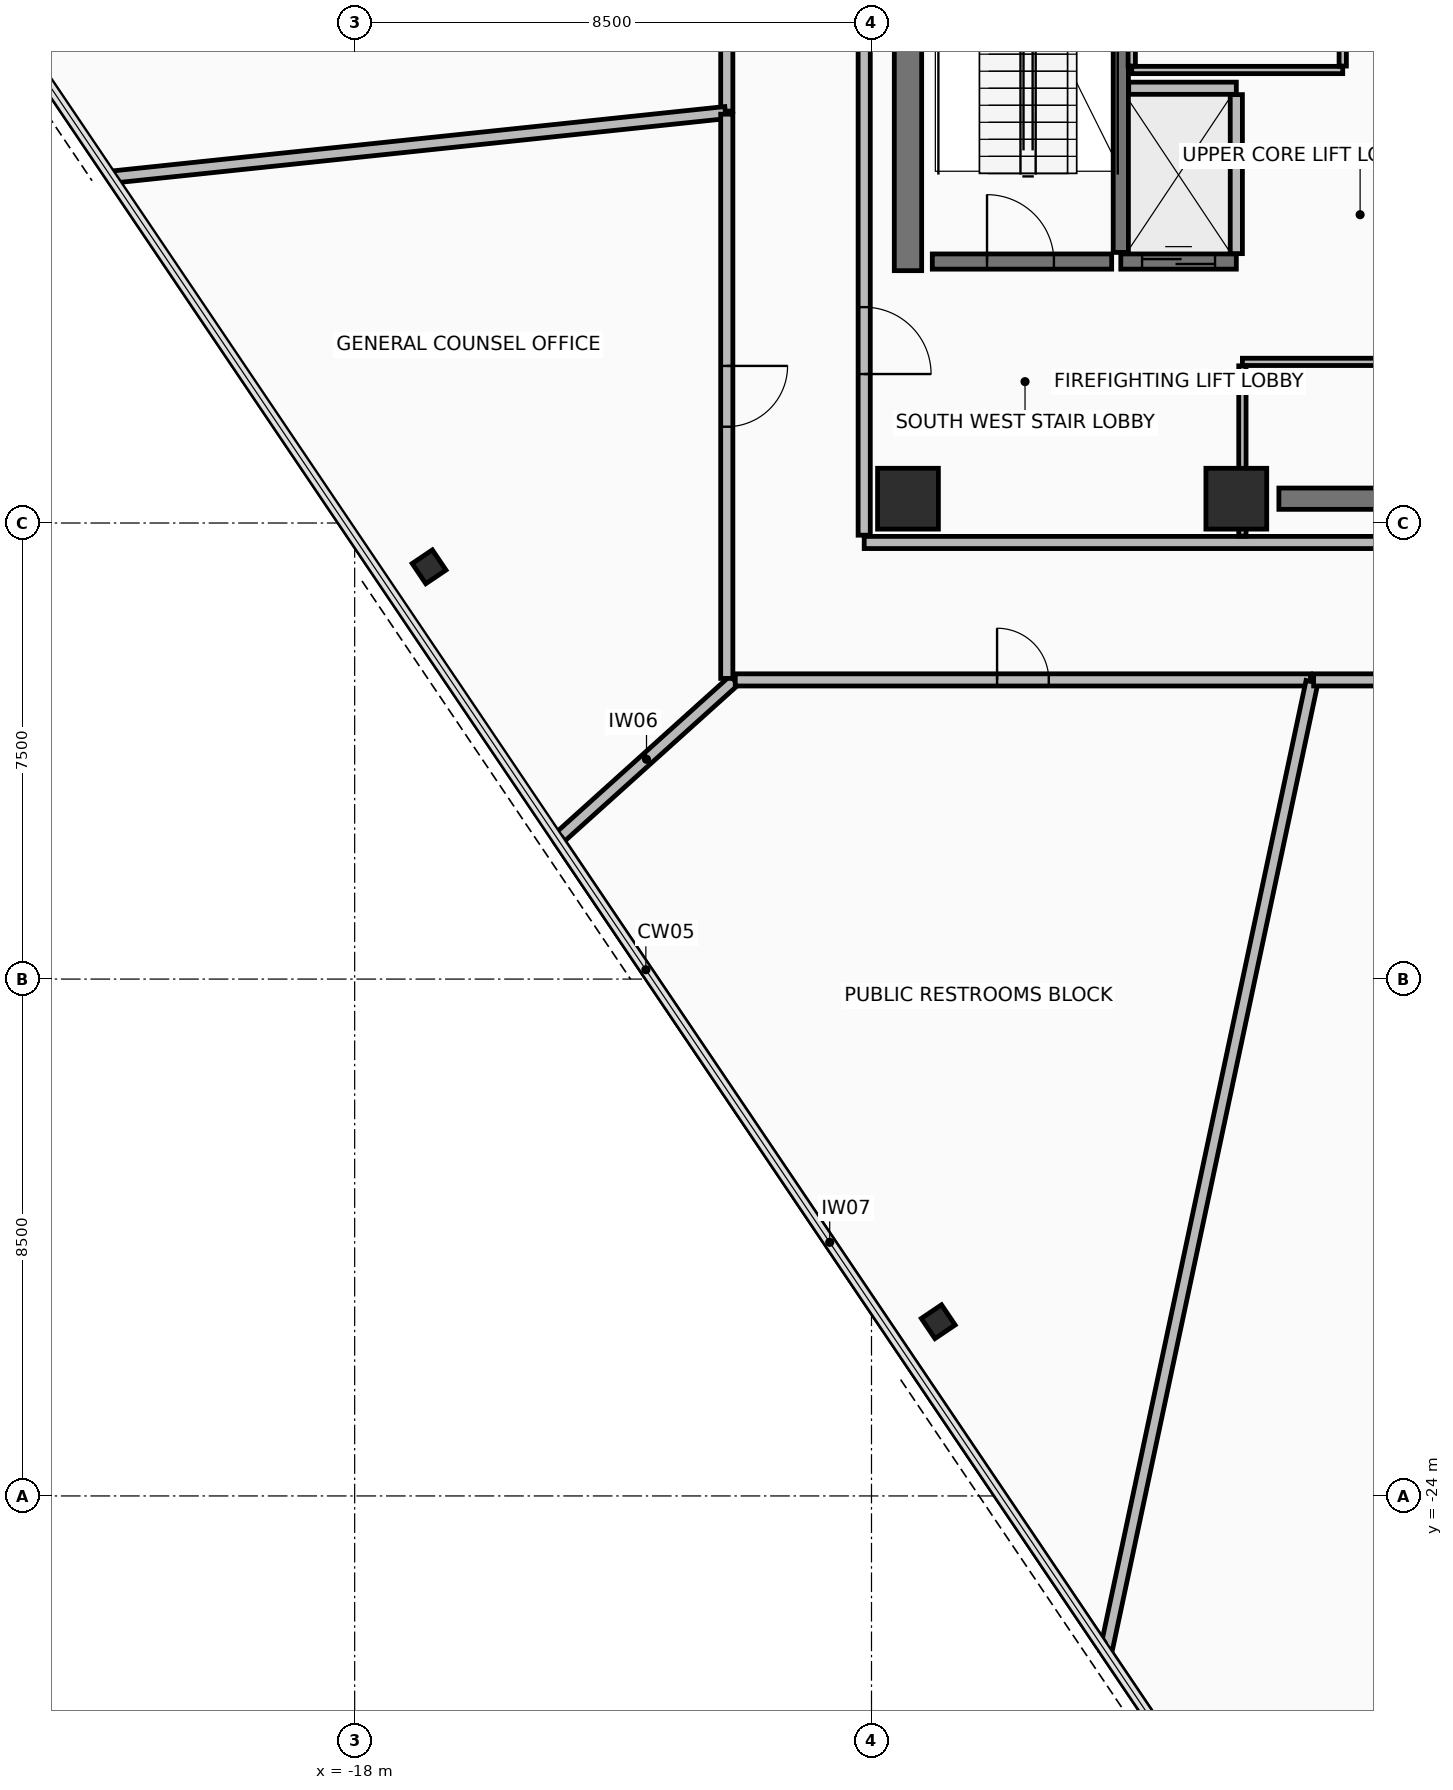
"""IFC4 building model, lengths in metres.
Left out: names, types, materials, properties, quantities, classifications, styles, units other than length and angle.
Written with IfcOpenShell. Run it as: python <this file> out.ifc"""

import sys

from ifc_helpers import new_model, si_unit, direction, frame, frame_2d, origin, origin_2d, place, context, subcontext, project, spatial, rectangle, hollow_rectangle, extrude, element, fill, save


model = new_model("IFC4")
c1 = context("Model", 3, precision=1e-05, world=origin(), true_north=direction((0.0, 1.0)))
c2 = subcontext(c1, "Body", "Model", "MODEL_VIEW")
j1 = project(units=[si_unit("LENGTHUNIT", "METRE"), si_unit("PLANEANGLEUNIT", "RADIAN")], contexts=[c1])
p1 = place(None, origin())
s1 = spatial("IfcSite", under=j1, at=p1, CompositionType="ELEMENT")
p2 = place(p1, origin())
s2 = spatial("IfcBuilding", under=s1, at=p2, CompositionType="ELEMENT")
p3 = place(p2, frame((0.0, 0.0, 260.6)))
s3 = spatial("IfcBuildingStorey", under=s2, at=p3, CompositionType="ELEMENT", Elevation=260.6)
for number, where, z_axis, x_axis in (
    (1, (-8.9, -7.6, 0.0), (0.0, 0.0, 1.0), (1.0, 0.0, 0.0)),
    (2, (-3.5, -7.6, 0.0), (0.0, 0.0, 1.0), (1.0, 0.0, 0.0)),
):
    element("IfcColumn", number, at=place(p3, frame(where, z_axis=z_axis, x_axis=x_axis)), inside=s3, PredefinedType="COLUMN", context=c2, shape_type="SweptSolid", body=[
        extrude(rectangle(XDim=1.0, YDim=1.0, at=origin_2d()), origin(), (0.0, 0.0, 1.0), 3.6),
    ])
for number, where, z_axis, x_axis in (
    (3, (-16.776, -8.72, 0.0), (0.0, 0.0, 1.0), (-0.559, 0.829, 0.0)),
    (4, (-8.402, -21.135, 0.0), (0.0, 0.0, 1.0), (-0.559, 0.829, 0.0)),
):
    element("IfcColumn", number, at=place(p3, frame(where, z_axis=z_axis, x_axis=x_axis)), inside=s3, PredefinedType="COLUMN", context=c2, shape_type="SweptSolid", body=[
        extrude(hollow_rectangle(XDim=0.4, YDim=0.4, WallThickness=0.025, at=origin_2d()), origin(), (0.0, 0.0, 1.0), 3.6),
    ])
p4 = place(p3, frame((-2.8, -7.6, 0.0), z_axis=(0.0, 0.0, 1.0), x_axis=(1.0, 0.0, 0.0)))
e5 = element("IfcWall", 5, at=p4, inside=s3, PredefinedType="SHEAR", context=c2, shape_type="SweptSolid", body=[
    extrude(rectangle(XDim=5.38, YDim=0.35, at=frame_2d((2.69, 0.0))), origin(), (0.0, 0.0, 1.0), 3.42),
])
p5 = place(p3, frame((-8.9, -3.85, 0.0), z_axis=(0.0, 0.0, 1.0), x_axis=(0.0, 1.0, 0.0)))
e6 = element("IfcWall", 6, at=p5, inside=s3, PredefinedType="SHEAR", context=c2, shape_type="SweptSolid", body=[
    extrude(rectangle(XDim=10.7, YDim=0.45, at=frame_2d((5.35, 0.0))), origin(), (0.0, 0.0, 1.0), 3.42),
])
p6 = place(p3, frame((-9.62, -8.32, 0.0), z_axis=(0.0, 0.0, 1.0), x_axis=(1.0, 0.0, 0.0)))
e7 = element("IfcWall", 7, at=p6, inside=s3, PredefinedType="PARTITIONING", context=c2, shape_type="SweptSolid", body=[
    extrude(rectangle(XDim=19.24, YDim=0.2, at=frame_2d((9.62, 0.0))), origin(), (0.0, 0.0, 1.0), 2.915),
])
p7 = place(p6, frame((8.57, 0.0, 0.0)))
e8 = element("IfcOpeningElement", 8, at=p7, cuts=e7, PredefinedType="OPENING", context=c2, shape_type="SweptSolid", body=[
    extrude(rectangle(XDim=0.9, YDim=2.1, at=frame_2d((0.45, 1.05))), frame((0.0, 0.11, 0.0), z_axis=(0.0, -1.0, 0.0), x_axis=(1.0, 0.0, 0.0)), (0.0, 0.0, 1.0), 0.22),
])
p8 = place(p6, frame((15.02, 0.0, 0.0)))
e9 = element("IfcOpeningElement", 9, at=p8, cuts=e7, PredefinedType="OPENING", context=c2, shape_type="SweptSolid", body=[
    extrude(rectangle(XDim=0.9, YDim=2.1, at=frame_2d((0.45, 1.05))), frame((0.0, 0.11, 0.0), z_axis=(0.0, -1.0, 0.0), x_axis=(1.0, 0.0, 0.0)), (0.0, 0.0, 1.0), 0.22),
])
p9 = place(p3, frame((-9.62, 8.2, 0.0), z_axis=(0.0, 0.0, 1.0), x_axis=(0.0, -1.0, 0.0)))
e10 = element("IfcWall", 10, at=p9, inside=s3, PredefinedType="PARTITIONING", context=c2, shape_type="SweptSolid", body=[
    extrude(rectangle(XDim=16.4, YDim=0.2, at=frame_2d((8.2, 0.0))), origin(), (0.0, 0.0, 1.0), 2.765),
])
p10 = place(p9, frame((12.65, 0.0, 0.0)))
e11 = element("IfcOpeningElement", 11, at=p10, cuts=e10, PredefinedType="OPENING", context=c2, shape_type="SweptSolid", body=[
    extrude(rectangle(XDim=1.1, YDim=2.15, at=frame_2d((0.55, 1.075))), frame((0.0, 0.11, 0.0), z_axis=(0.0, -1.0, 0.0), x_axis=(1.0, 0.0, 0.0)), (0.0, 0.0, 1.0), 0.22),
])
p11 = place(p3, frame((-5.4, -3.55, 0.0), z_axis=(0.0, 0.0, 1.0), x_axis=(0.0, 1.0, 0.0)))
e12 = element("IfcWall", 12, at=p11, inside=s3, PredefinedType="SHEAR", context=c2, shape_type="SweptSolid", body=[
    extrude(rectangle(XDim=7.3, YDim=0.25, at=frame_2d((3.65, 0.0))), origin(), (0.0, 0.0, 1.0), 3.42),
])
p12 = place(p3, frame((-8.5, -3.7, 0.0), z_axis=(0.0, 0.0, 1.0), x_axis=(1.0, 0.0, 0.0)))
e13 = element("IfcWall", 13, at=p12, inside=s3, PredefinedType="SHEAR", context=c2, shape_type="SweptSolid", body=[
    extrude(rectangle(XDim=2.95, YDim=0.25, at=frame_2d((1.475, 0.0))), origin(), (0.0, 0.0, 1.0), 3.42),
])
p13 = place(p12, frame((0.9, 0.0, 0.0)))
e14 = element("IfcOpeningElement", 14, at=p13, cuts=e13, PredefinedType="OPENING", context=c2, shape_type="SweptSolid", body=[
    extrude(rectangle(XDim=1.1, YDim=2.15, at=frame_2d((0.55, 1.075))), frame((0.0, 0.135, 0.0), z_axis=(0.0, -1.0, 0.0), x_axis=(1.0, 0.0, 0.0)), (0.0, 0.0, 1.0), 0.27),
])
p14 = place(p3, frame((-5.4, -3.7, 0.0), z_axis=(0.0, 0.0, 1.0), x_axis=(1.0, 0.0, 0.0)))
e15 = element("IfcWall", 15, at=p14, inside=s3, PredefinedType="SHEAR", context=c2, shape_type="SweptSolid", body=[
    extrude(rectangle(XDim=1.9, YDim=0.25, at=frame_2d((0.95, 0.0))), origin(), (0.0, 0.0, 1.0), 3.42),
])
p15 = place(p14, frame((0.35, 0.0, 0.0)))
e16 = element("IfcOpeningElement", 16, at=p15, cuts=e15, PredefinedType="OPENING", context=c2, shape_type="SweptSolid", body=[
    extrude(rectangle(XDim=1.2, YDim=2.2, at=frame_2d((0.6, 1.1))), frame((0.0, 0.135, 0.0), z_axis=(0.0, -1.0, 0.0), x_axis=(1.0, 0.0, 0.0)), (0.0, 0.0, 1.0), 0.27),
])
p16 = place(p3, frame((-5.27, -0.85, 0.0), z_axis=(0.0, 0.0, 1.0), x_axis=(1.0, 0.0, 0.0)))
e17 = element("IfcWall", 17, at=p16, inside=s3, PredefinedType="PARTITIONING", context=c2, shape_type="SweptSolid", body=[
    extrude(rectangle(XDim=1.77, YDim=0.2, at=frame_2d((0.885, 0.0))), origin(), (0.0, 0.0, 1.0), 3.42),
])
p17 = place(p3, frame((-3.5, -3.57, 0.0), z_axis=(0.0, 0.0, 1.0), x_axis=(0.0, 1.0, 0.0)))
e18 = element("IfcWall", 18, at=p17, inside=s3, PredefinedType="PARTITIONING", context=c2, shape_type="SweptSolid", body=[
    extrude(rectangle(XDim=2.615, YDim=0.2, at=frame_2d((1.308, 0.0))), origin(), (0.0, 0.0, 1.0), 3.42),
])
p18 = place(p3, frame((-5.22, -0.55, 0.0), z_axis=(0.0, 0.0, 1.0), x_axis=(1.0, 0.0, 0.0)))
e19 = element("IfcWall", 19, at=p18, inside=s3, PredefinedType="PARTITIONING", context=c2, shape_type="SweptSolid", body=[
    extrude(rectangle(XDim=3.47, YDim=0.12, at=frame_2d((1.735, 0.0))), origin(), (0.0, 0.0, 1.0), 3.42),
])
p19 = place(p3, frame((-1.75, -0.485, 0.0), z_axis=(0.0, 0.0, 1.0), x_axis=(0.0, 1.0, 0.0)))
e20 = element("IfcWall", 20, at=p19, inside=s3, PredefinedType="PARTITIONING", context=c2, shape_type="SweptSolid", body=[
    extrude(rectangle(XDim=1.825, YDim=0.12, at=frame_2d((0.913, 0.0))), origin(), (0.0, 0.0, 1.0), 3.42),
])
p20 = place(p19, frame((0.488, 0.0, 0.0)))
e21 = element("IfcOpeningElement", 21, at=p20, cuts=e20, PredefinedType="OPENING", context=c2, shape_type="SweptSolid", body=[
    extrude(rectangle(XDim=0.85, YDim=2.1, at=frame_2d((0.425, 1.05))), frame((0.0, 0.07, 0.0), z_axis=(0.0, -1.0, 0.0), x_axis=(1.0, 0.0, 0.0)), (0.0, 0.0, 1.0), 0.14),
])
p21 = place(p3, frame((-5.22, 1.275, 0.0), z_axis=(0.0, 0.0, 1.0), x_axis=(0.0, -1.0, 0.0)))
e22 = element("IfcWall", 22, at=p21, inside=s3, PredefinedType="PARTITIONING", context=c2, shape_type="SweptSolid", body=[
    extrude(rectangle(XDim=1.76, YDim=0.12, at=frame_2d((0.88, 0.0))), origin(), (0.0, 0.0, 1.0), 3.42),
])
p22 = place(p3, frame((2.135, -5.35, 0.0), z_axis=(0.0, 0.0, 1.0), x_axis=(-1.0, 0.0, 0.0)))
e23 = element("IfcWall", 23, at=p22, inside=s3, PredefinedType="PARTITIONING", context=c2, shape_type="SweptSolid", body=[
    extrude(rectangle(XDim=5.535, YDim=0.12, at=frame_2d((2.768, 0.0))), origin(), (0.0, 0.0, 1.0), 2.715),
])
p23 = place(p3, frame((-3.4, -5.415, 0.0), z_axis=(0.0, 0.0, 1.0), x_axis=(0.0, -1.0, 0.0)))
e24 = element("IfcWall", 24, at=p23, inside=s3, PredefinedType="PARTITIONING", context=c2, shape_type="SweptSolid", body=[
    extrude(rectangle(XDim=2.8, YDim=0.12, at=frame_2d((1.4, 0.0))), origin(), (0.0, 0.0, 1.0), 2.715),
])
p24 = place(p3, frame((-14.643, -13.185, 0.0), z_axis=(0.0, 0.0, 1.0), x_axis=(0.74316596467, 0.669107128161, 0.0)))
e25 = element("IfcWall", 25, at=p24, inside=s3, PredefinedType="PARTITIONING", context=c2, shape_type="SweptSolid", body=[
    extrude(rectangle(XDim=3.883, YDim=0.2, at=frame_2d((1.942, 0.0))), origin(), (0.0, 0.0, 1.0), 2.765),
])
p25 = place(p3, frame((-11.741, -10.58, 0.0), z_axis=(0.0, 0.0, 1.0), x_axis=(1.0, 0.0, 0.0)))
e26 = element("IfcWall", 26, at=p25, inside=s3, PredefinedType="PARTITIONING", context=c2, shape_type="SweptSolid", body=[
    extrude(rectangle(XDim=9.461, YDim=0.2, at=frame_2d((4.73, 0.0))), origin(), (0.0, 0.0, 1.0), 2.915),
])
p26 = place(p25, frame((4.306, 0.0, 0.0)))
e27 = element("IfcOpeningElement", 27, at=p26, cuts=e26, PredefinedType="OPENING", context=c2, shape_type="SweptSolid", body=[
    extrude(rectangle(XDim=0.85, YDim=2.1, at=frame_2d((0.425, 1.05))), frame((0.0, 0.11, 0.0), z_axis=(0.0, -1.0, 0.0), x_axis=(1.0, 0.0, 0.0)), (0.0, 0.0, 1.0), 0.22),
])
p27 = place(p3, frame((-2.255, -10.61, 0.0), z_axis=(0.0, 0.0, 1.0), x_axis=(-0.207902262157, -0.97814960481, 0.0)))
e28 = element("IfcWall", 28, at=p27, inside=s3, PredefinedType="PARTITIONING", context=c2, shape_type="SweptSolid", body=[
    extrude(rectangle(XDim=16.309, YDim=0.2, at=frame_2d((8.154, 0.0))), origin(), (0.0, 0.0, 1.0), 2.765),
])
p28 = place(p3, frame((-5.728, -26.441, 0.0), z_axis=(0.0, 0.0, 1.0), x_axis=(-0.559188397691, 0.829040611724, 0.0)))
e29 = element("IfcWall", 29, at=p28, inside=s3, PredefinedType="PARTITIONING", context=c2, shape_type="SweptSolid", body=[
    extrude(rectangle(XDim=15.951, YDim=0.15, at=frame_2d((7.976, 0.0))), origin(), (0.0, 0.0, 1.0), 3.42),
])
p29 = place(p3, frame((-0.024, -34.897, 0.0), z_axis=(0.0, 0.0, 1.0), x_axis=(-0.559196847428, 0.829034912309, 0.0)))
e30 = element("IfcWall", 30, at=p29, inside=s3, PredefinedType="PARTITIONING", context=c2, shape_type="SweptSolid", body=[
    extrude(rectangle(XDim=10.043, YDim=0.15, at=frame_2d((5.021, 0.0))), origin(), (0.0, 0.0, 1.0), 3.42),
])
p30 = place(p3, frame((-2.229, -10.58, 0.0), z_axis=(0.0, 0.0, 1.0), x_axis=(1.0, 0.0, 0.0)))
e31 = element("IfcWall", 31, at=p30, inside=s3, PredefinedType="PARTITIONING", context=c2, shape_type="SweptSolid", body=[
    extrude(rectangle(XDim=6.923, YDim=0.2, at=frame_2d((3.461, 0.0))), origin(), (0.0, 0.0, 1.0), 3.42),
])
p31 = place(p30, frame((3.036, 0.0, 0.0)))
e32 = element("IfcOpeningElement", 32, at=p31, cuts=e31, PredefinedType="OPENING", context=c2, shape_type="SweptSolid", body=[
    extrude(rectangle(XDim=0.85, YDim=2.1, at=frame_2d((0.425, 1.05))), frame((0.0, 0.11, 0.0), z_axis=(0.0, -1.0, 0.0), x_axis=(1.0, 0.0, 0.0)), (0.0, 0.0, 1.0), 0.22),
])
p32 = place(p3, frame((-11.88, 6.844, 0.0), z_axis=(0.0, 0.0, 1.0), x_axis=(0.0, -1.0, 0.0)))
e33 = element("IfcWall", 33, at=p32, inside=s3, PredefinedType="PARTITIONING", context=c2, shape_type="SweptSolid", body=[
    extrude(rectangle(XDim=8.071, YDim=0.2, at=frame_2d((4.035, 0.0))), origin(), (0.0, 0.0, 1.0), 2.915),
])
p33 = place(p32, frame((3.535, 0.0, 0.0)))
e34 = element("IfcOpeningElement", 34, at=p33, cuts=e33, PredefinedType="OPENING", context=c2, shape_type="SweptSolid", body=[
    extrude(rectangle(XDim=1.0, YDim=2.15, at=frame_2d((0.5, 1.075))), frame((0.0, 0.11, 0.0), z_axis=(0.0, -1.0, 0.0), x_axis=(1.0, 0.0, 0.0)), (0.0, 0.0, 1.0), 0.22),
])
p34 = place(p3, frame((-11.902, -1.251, 0.0), z_axis=(0.0, 0.0, 1.0), x_axis=(-0.994521271801, -0.104534395947, 0.0)))
e35 = element("IfcWall", 35, at=p34, inside=s3, PredefinedType="PARTITIONING", context=c2, shape_type="SweptSolid", body=[
    extrude(rectangle(XDim=10.141, YDim=0.2, at=frame_2d((5.07, 0.0))), origin(), (0.0, 0.0, 1.0), 2.765),
])
p35 = place(p3, frame((-11.88, -1.276, 0.0), z_axis=(0.0, 0.0, 1.0), x_axis=(0.0, -1.0, 0.0)))
e36 = element("IfcWall", 36, at=p35, inside=s3, PredefinedType="PARTITIONING", context=c2, shape_type="SweptSolid", body=[
    extrude(rectangle(XDim=9.279, YDim=0.2, at=frame_2d((4.64, 0.0))), origin(), (0.0, 0.0, 1.0), 2.915),
])
p36 = place(p35, frame((4.14, 0.0, 0.0)))
e37 = element("IfcOpeningElement", 37, at=p36, cuts=e36, PredefinedType="OPENING", context=c2, shape_type="SweptSolid", body=[
    extrude(rectangle(XDim=1.0, YDim=2.15, at=frame_2d((0.5, 1.075))), frame((0.0, 0.11, 0.0), z_axis=(0.0, -1.0, 0.0), x_axis=(1.0, 0.0, 0.0)), (0.0, 0.0, 1.0), 0.22),
])
p37 = place(p10, frame((1.1, 0.0, 0.0), z_axis=(0.0, 0.0, 1.0), x_axis=(-1.0, 0.0, 0.0)))
e38 = element("IfcDoor", 38, at=p37, inside=s3, OperationType="SINGLE_SWING_LEFT", PredefinedType="DOOR", context=c2, shape_type="SweptSolid", body=[
    extrude(rectangle(XDim=1.1, YDim=2.15, at=frame_2d((0.55, 1.075))), frame((0.0, 0.025, 0.0), z_axis=(0.0, -1.0, 0.0), x_axis=(1.0, 0.0, 0.0)), (0.0, 0.0, 1.0), 0.05),
])
fill(e11, e38)
p38 = place(p13, origin())
e39 = element("IfcDoor", 39, at=p38, inside=s3, OperationType="SINGLE_SWING_LEFT", PredefinedType="DOOR", context=c2, shape_type="SweptSolid", body=[
    extrude(rectangle(XDim=1.1, YDim=2.15, at=frame_2d((0.55, 1.075))), frame((0.0, 0.025, 0.0), z_axis=(0.0, -1.0, 0.0), x_axis=(1.0, 0.0, 0.0)), (0.0, 0.0, 1.0), 0.05),
])
fill(e14, e39)
p39 = place(p15, origin())
e40 = element("IfcDoor", 40, at=p39, inside=s3, OperationType="SLIDING_TO_RIGHT", PredefinedType="DOOR", context=c2, shape_type="SweptSolid", body=[
    extrude(rectangle(XDim=1.2, YDim=2.2, at=frame_2d((0.6, 1.1))), frame((0.0, 0.025, 0.0), z_axis=(0.0, -1.0, 0.0), x_axis=(1.0, 0.0, 0.0)), (0.0, 0.0, 1.0), 0.05),
])
fill(e16, e40)
p40 = place(p26, origin())
e41 = element("IfcDoor", 41, at=p40, inside=s3, OperationType="SINGLE_SWING_RIGHT", PredefinedType="DOOR", context=c2, shape_type="SweptSolid", body=[
    extrude(rectangle(XDim=0.85, YDim=2.1, at=frame_2d((0.425, 1.05))), frame((0.0, 0.025, 0.0), z_axis=(0.0, -1.0, 0.0), x_axis=(1.0, 0.0, 0.0)), (0.0, 0.0, 1.0), 0.05),
])
fill(e27, e41)
p41 = place(p36, origin())
e42 = element("IfcDoor", 42, at=p41, inside=s3, OperationType="SINGLE_SWING_RIGHT", PredefinedType="DOOR", context=c2, shape_type="SweptSolid", body=[
    extrude(rectangle(XDim=1.0, YDim=2.15, at=frame_2d((0.5, 1.075))), frame((0.0, 0.025, 0.0), z_axis=(0.0, -1.0, 0.0), x_axis=(1.0, 0.0, 0.0)), (0.0, 0.0, 1.0), 0.05),
])
fill(e37, e42)
save(model, sys.argv[1])
